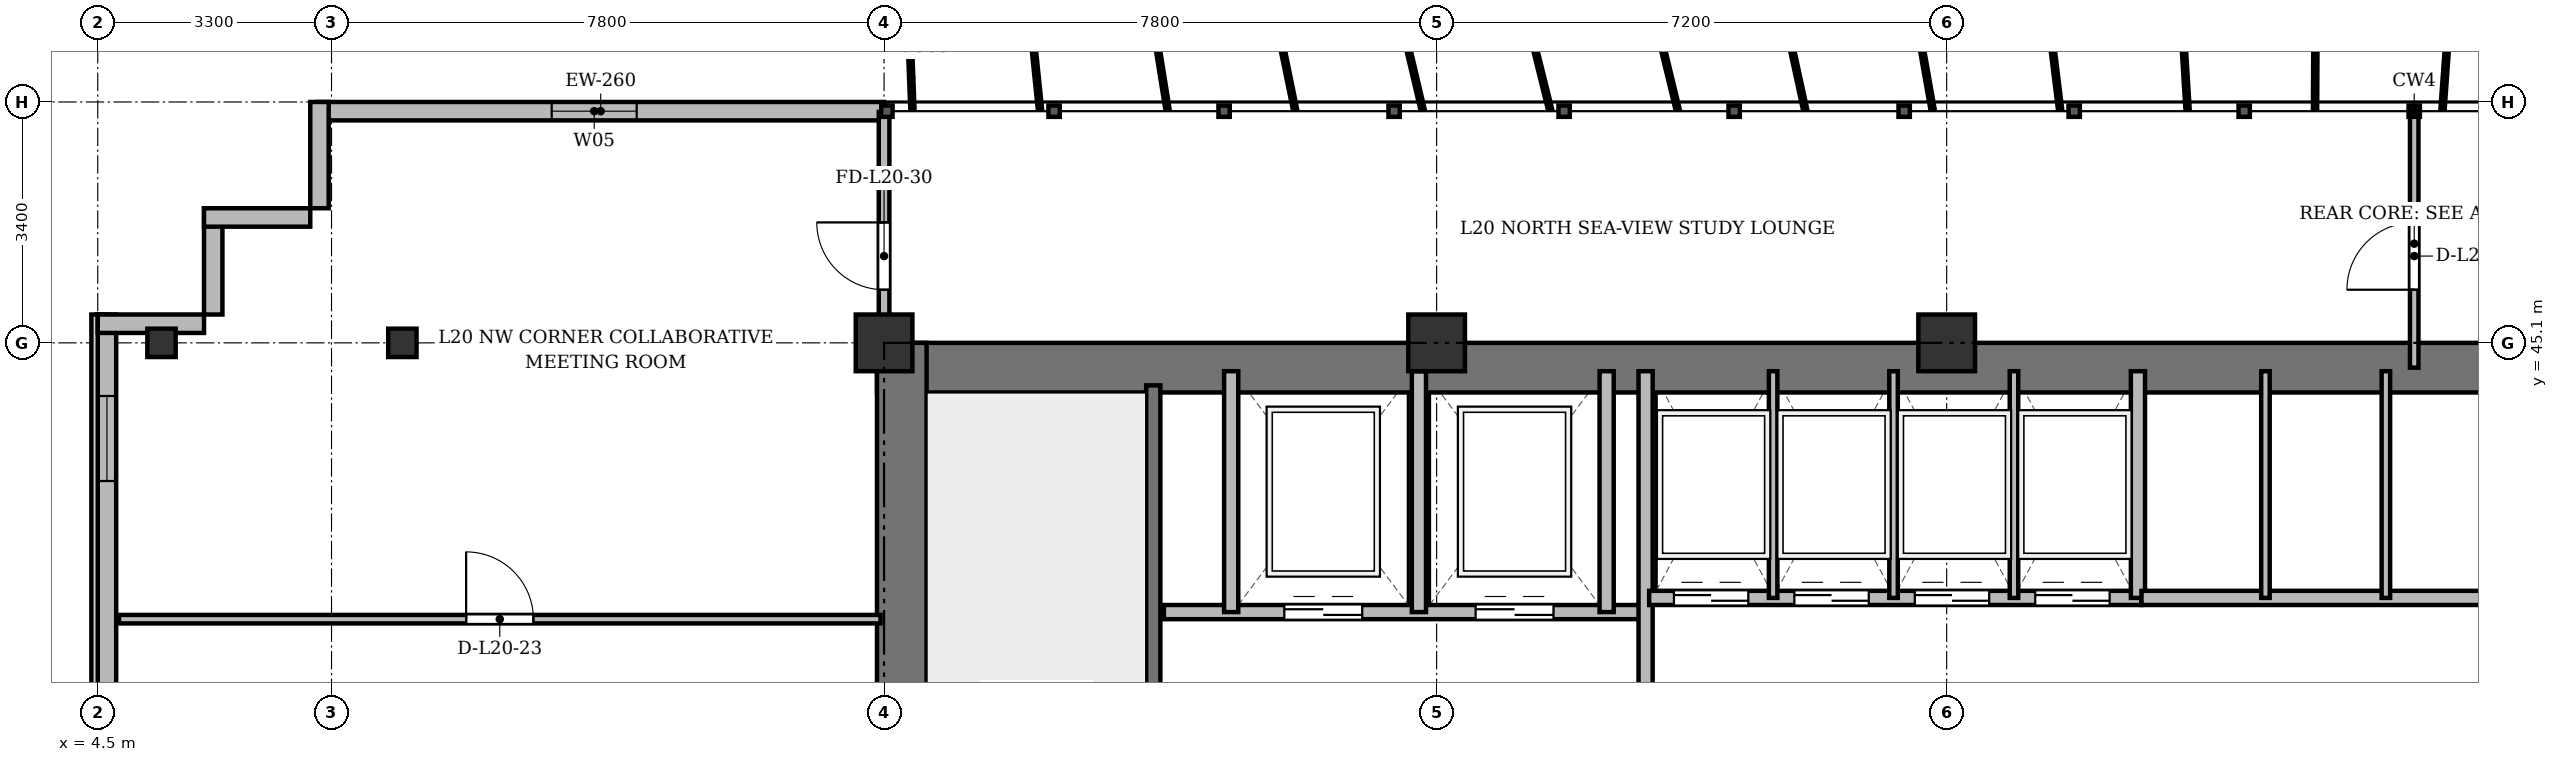
"""IFC4 building model, lengths in metres.
Left out: names, types, materials, properties, quantities, classifications, styles, units other than length and angle.
Written with IfcOpenShell. Run it as: python <this file> out.ifc"""

import sys

from ifc_helpers import new_model, si_unit, direction, frame, frame_2d, origin, origin_2d, place, context, subcontext, project, spatial, rectangle, i_section, extrude, source, transform, mapped, element, fill, save


model = new_model("IFC4")
c1 = context("Model", 3, precision=1e-05, world=origin(), true_north=direction((0.0, 1.0)))
c2 = subcontext(c1, "Body", "Model", "MODEL_VIEW")
j1 = project(units=[si_unit("LENGTHUNIT", "METRE"), si_unit("PLANEANGLEUNIT", "RADIAN")], contexts=[c1])
p1 = place(None, origin())
s1 = spatial("IfcSite", under=j1, at=p1, CompositionType="ELEMENT")
p2 = place(p1, origin())
s2 = spatial("IfcBuilding", under=s1, at=p2, CompositionType="ELEMENT")
p3 = place(p2, frame((0.0, 0.0, 81.7)))
s3 = spatial("IfcBuildingStorey", under=s2, at=p3, CompositionType="ELEMENT", Elevation=81.7)
m1 = source(origin(), c2, "Body", "SweptSolid", [
    extrude(i_section(OverallWidth=0.4, OverallDepth=0.4, WebThickness=0.022, FlangeThickness=0.035, at=origin_2d()), origin(), (0.0, 0.0, 1.0), 3.6),
])
for number, where, z_axis, x_axis in (
    (1, (5.4, 45.1, 0.0), (0.0, 0.0, 1.0), (1.0, 0.0, 0.0)),
    (2, (8.8, 45.1, 0.0), (0.0, 0.0, 1.0), (1.0, 0.0, 0.0)),
):
    element("IfcColumn", number, at=place(p3, frame(where, z_axis=z_axis, x_axis=x_axis)), inside=s3, PredefinedType="COLUMN", context=c2, shape_type="MappedRepresentation", body=[
        mapped(m1, transform((0.0, 0.0, 0.0), x_axis=(1.0, 0.0, 0.0), y_axis=(0.0, 1.0, 0.0), z_axis=(0.0, 0.0, 1.0), scale=1.0)),
    ])
m2 = source(origin(), c2, "Body", "SweptSolid", [
    extrude(rectangle(XDim=0.8, YDim=0.8, at=origin_2d()), origin(), (0.0, 0.0, 1.0), 3.6),
])
for number, where, z_axis, x_axis in (
    (3, (15.6, 45.1, 0.0), (0.0, 0.0, 1.0), (1.0, 0.0, 0.0)),
    (4, (23.4, 45.1, 0.0), (0.0, 0.0, 1.0), (1.0, 0.0, 0.0)),
    (5, (30.6, 45.1, 0.0), (0.0, 0.0, 1.0), (1.0, 0.0, 0.0)),
):
    element("IfcColumn", number, at=place(p3, frame(where, z_axis=z_axis, x_axis=x_axis)), inside=s3, PredefinedType="COLUMN", context=c2, shape_type="MappedRepresentation", body=[
        mapped(m2, transform((0.0, 0.0, 0.0), x_axis=(1.0, 0.0, 0.0), y_axis=(0.0, 1.0, 0.0), z_axis=(0.0, 0.0, 1.0), scale=1.0)),
    ])
p4 = place(p3, frame((7.6, 48.37, 0.0), z_axis=(0.0, 0.0, 1.0), x_axis=(1.0, 0.0, 0.0)))
e6 = element("IfcWall", 6, at=p4, inside=s3, PredefinedType="SOLIDWALL", context=c2, shape_type="SweptSolid", body=[
    extrude(rectangle(XDim=8.0, YDim=0.26, at=frame_2d((4.0, 0.0))), origin(), (0.0, 0.0, 1.0), 3.34),
])
p5 = place(p4, frame((3.308, 0.0, 0.9)))
e7 = element("IfcOpeningElement", 7, at=p5, cuts=e6, PredefinedType="OPENING", context=c2, shape_type="SweptSolid", body=[
    extrude(rectangle(XDim=1.2, YDim=1.65, at=frame_2d((0.6, 0.825))), frame((0.0, 0.14, 0.0), z_axis=(0.0, -1.0, 0.0), x_axis=(1.0, 0.0, 0.0)), (0.0, 0.0, 1.0), 0.28),
])
p6 = place(p3, frame((4.63, 5.9, 0.0), z_axis=(0.0, 0.0, 1.0), x_axis=(0.0, 1.0, 0.0)))
e8 = element("IfcWall", 8, at=p6, inside=s3, PredefinedType="SOLIDWALL", context=c2, shape_type="SweptSolid", body=[
    extrude(rectangle(XDim=39.6, YDim=0.26, at=frame_2d((19.8, 0.0))), origin(), (0.0, 0.0, 1.0), 3.34),
])
p7 = place(p6, frame((1.45, 0.0, 0.92)))
e9 = element("IfcOpeningElement", 9, at=p7, cuts=e8, PredefinedType="OPENING", context=c2, shape_type="SweptSolid", body=[
    extrude(rectangle(XDim=1.2, YDim=1.65, at=frame_2d((0.6, 0.825))), frame((0.0, 0.14, 0.0), z_axis=(0.0, -1.0, 0.0), x_axis=(1.0, 0.0, 0.0)), (0.0, 0.0, 1.0), 0.28),
])
p8 = place(p6, frame((4.2, 0.0, 0.92)))
e10 = element("IfcOpeningElement", 10, at=p8, cuts=e8, PredefinedType="OPENING", context=c2, shape_type="SweptSolid", body=[
    extrude(rectangle(XDim=2.6, YDim=1.9, at=frame_2d((1.3, 0.95))), frame((0.0, 0.14, 0.0), z_axis=(0.0, -1.0, 0.0), x_axis=(1.0, 0.0, 0.0)), (0.0, 0.0, 1.0), 0.28),
])
p9 = place(p6, frame((8.4, 0.0, 0.92)))
e11 = element("IfcOpeningElement", 11, at=p9, cuts=e8, PredefinedType="OPENING", context=c2, shape_type="SweptSolid", body=[
    extrude(rectangle(XDim=2.6, YDim=1.9, at=frame_2d((1.3, 0.95))), frame((0.0, 0.14, 0.0), z_axis=(0.0, -1.0, 0.0), x_axis=(1.0, 0.0, 0.0)), (0.0, 0.0, 1.0), 0.28),
])
p10 = place(p6, frame((15.6, 0.0, 0.92)))
e12 = element("IfcOpeningElement", 12, at=p10, cuts=e8, PredefinedType="OPENING", context=c2, shape_type="SweptSolid", body=[
    extrude(rectangle(XDim=2.6, YDim=1.9, at=frame_2d((1.3, 0.95))), frame((0.0, 0.14, 0.0), z_axis=(0.0, -1.0, 0.0), x_axis=(1.0, 0.0, 0.0)), (0.0, 0.0, 1.0), 0.28),
])
p11 = place(p6, frame((29.6, 0.0, 0.92)))
e13 = element("IfcOpeningElement", 13, at=p11, cuts=e8, PredefinedType="OPENING", context=c2, shape_type="SweptSolid", body=[
    extrude(rectangle(XDim=2.6, YDim=1.9, at=frame_2d((1.3, 0.95))), frame((0.0, 0.14, 0.0), z_axis=(0.0, -1.0, 0.0), x_axis=(1.0, 0.0, 0.0)), (0.0, 0.0, 1.0), 0.28),
])
p12 = place(p6, frame((37.25, 0.0, 0.92)))
e14 = element("IfcOpeningElement", 14, at=p12, cuts=e8, PredefinedType="OPENING", context=c2, shape_type="SweptSolid", body=[
    extrude(rectangle(XDim=1.2, YDim=1.65, at=frame_2d((0.6, 0.825))), frame((0.0, 0.14, 0.0), z_axis=(0.0, -1.0, 0.0), x_axis=(1.0, 0.0, 0.0)), (0.0, 0.0, 1.0), 0.28),
])
p13 = place(p3, frame((4.5, 45.37, 0.0), z_axis=(0.0, 0.0, 1.0), x_axis=(1.0, 0.0, 0.0)))
e15 = element("IfcWall", 15, at=p13, inside=s3, PredefinedType="SOLIDWALL", context=c2, shape_type="SweptSolid", body=[
    extrude(rectangle(XDim=1.5, YDim=0.26, at=frame_2d((0.75, 0.0))), origin(), (0.0, 0.0, 1.0), 2.752),
])
for number, where, z_axis, x_axis in (
    (16, (6.13, 45.5, 0.0), (0.0, 0.0, 1.0), (0.0, 1.0, 0.0)),
    (17, (6.0, 46.87, 0.0), (0.0, 0.0, 1.0), (1.0, 0.0, 0.0)),
    (18, (7.63, 47.0, 0.0), (0.0, 0.0, 1.0), (0.0, 1.0, 0.0)),
):
    element("IfcWall", number, at=place(p3, frame(where, z_axis=z_axis, x_axis=x_axis)), inside=s3, PredefinedType="SOLIDWALL", context=c2, shape_type="SweptSolid", body=[
        extrude(rectangle(XDim=1.5, YDim=0.26, at=frame_2d((0.75, 0.0))), origin(), (0.0, 0.0, 1.0), 3.34),
    ])
p14 = place(p3, frame((15.5, 44.75, 0.0), z_axis=(0.0, 0.0, 1.0), x_axis=(1.0, 0.0, 0.0)))
e19 = element("IfcWall", 19, at=p14, inside=s3, PredefinedType="SHEAR", context=c2, shape_type="SweptSolid", body=[
    extrude(rectangle(XDim=43.4, YDim=0.7, at=frame_2d((21.7, 0.0))), origin(), (0.0, 0.0, 1.0), 3.34),
])
p15 = place(p3, frame((15.85, 33.4, 0.0), z_axis=(0.0, 0.0, 1.0), x_axis=(0.0, 1.0, 0.0)))
e20 = element("IfcWall", 20, at=p15, inside=s3, PredefinedType="SHEAR", context=c2, shape_type="SweptSolid", body=[
    extrude(rectangle(XDim=11.7, YDim=0.7, at=frame_2d((5.85, 0.0))), origin(), (0.0, 0.0, 1.0), 3.34),
])
p16 = place(p3, frame((19.4, 33.4, 0.0), z_axis=(0.0, 0.0, 1.0), x_axis=(0.0, 1.0, 0.0)))
e21 = element("IfcWall", 21, at=p16, inside=s3, PredefinedType="SHEAR", context=c2, shape_type="SweptSolid", body=[
    extrude(rectangle(XDim=11.1, YDim=0.2, at=frame_2d((5.55, 0.0))), origin(), (0.0, 0.0, 1.0), 3.34),
])
p17 = place(p16, frame((0.85, 0.0, 0.0)))
e22 = element("IfcOpeningElement", 22, at=p17, cuts=e21, PredefinedType="OPENING", context=c2, shape_type="SweptSolid", body=[
    extrude(rectangle(XDim=1.1, YDim=2.15, at=frame_2d((0.55, 1.075))), frame((0.0, 0.11, 0.0), z_axis=(0.0, -1.0, 0.0), x_axis=(1.0, 0.0, 0.0)), (0.0, 0.0, 1.0), 0.22),
])
p18 = place(p3, frame((19.55, 41.3, 0.0), z_axis=(0.0, 0.0, 1.0), x_axis=(1.0, 0.0, 0.0)))
e23 = element("IfcWall", 23, at=p18, inside=s3, PredefinedType="SOLIDWALL", context=c2, shape_type="SweptSolid", body=[
    extrude(rectangle(XDim=6.75, YDim=0.2, at=frame_2d((3.375, 0.0))), origin(), (0.0, 0.0, 1.0), 3.34),
])
p19 = place(p18, frame((1.7, 0.0, 0.0)))
e24 = element("IfcOpeningElement", 24, at=p19, cuts=e23, PredefinedType="OPENING", context=c2, shape_type="SweptSolid", body=[
    extrude(rectangle(XDim=1.1, YDim=2.15, at=frame_2d((0.55, 1.075))), frame((0.0, 0.11, 0.0), z_axis=(0.0, -1.0, 0.0), x_axis=(1.0, 0.0, 0.0)), (0.0, 0.0, 1.0), 0.22),
])
p20 = place(p18, frame((4.4, 0.0, 0.0)))
e25 = element("IfcOpeningElement", 25, at=p20, cuts=e23, PredefinedType="OPENING", context=c2, shape_type="SweptSolid", body=[
    extrude(rectangle(XDim=1.1, YDim=2.15, at=frame_2d((0.55, 1.075))), frame((0.0, 0.11, 0.0), z_axis=(0.0, -1.0, 0.0), x_axis=(1.0, 0.0, 0.0)), (0.0, 0.0, 1.0), 0.22),
])
for number, where, z_axis, x_axis in (
    (26, (20.5, 41.3, 0.0), (0.0, 0.0, 1.0), (0.0, 1.0, 0.0)),
    (27, (23.15, 41.3, 0.0), (0.0, 0.0, 1.0), (0.0, 1.0, 0.0)),
    (28, (25.8, 41.3, 0.0), (0.0, 0.0, 1.0), (0.0, 1.0, 0.0)),
):
    element("IfcWall", number, at=place(p3, frame(where, z_axis=z_axis, x_axis=x_axis)), inside=s3, PredefinedType="SOLIDWALL", context=c2, shape_type="SweptSolid", body=[
        extrude(rectangle(XDim=3.4, YDim=0.2, at=frame_2d((1.7, 0.0))), origin(), (0.0, 0.0, 1.0), 3.34),
    ])
p21 = place(p3, frame((26.35, 33.4, 0.0), z_axis=(0.0, 0.0, 1.0), x_axis=(0.0, 1.0, 0.0)))
e29 = element("IfcWall", 29, at=p21, inside=s3, PredefinedType="SOLIDWALL", context=c2, shape_type="SweptSolid", body=[
    extrude(rectangle(XDim=11.3, YDim=0.2, at=frame_2d((5.65, 0.0))), origin(), (0.0, 0.0, 1.0), 2.752),
])
p22 = place(p3, frame((26.4, 41.5, 0.0), z_axis=(0.0, 0.0, 1.0), x_axis=(1.0, 0.0, 0.0)))
e30 = element("IfcWall", 30, at=p22, inside=s3, PredefinedType="SOLIDWALL", context=c2, shape_type="SweptSolid", body=[
    extrude(rectangle(XDim=6.95, YDim=0.2, at=frame_2d((3.475, 0.0))), origin(), (0.0, 0.0, 1.0), 3.34),
])
p23 = place(p22, frame((0.35, 0.0, 0.0)))
e31 = element("IfcOpeningElement", 31, at=p23, cuts=e30, PredefinedType="OPENING", context=c2, shape_type="SweptSolid", body=[
    extrude(rectangle(XDim=1.05, YDim=2.15, at=frame_2d((0.525, 1.075))), frame((0.0, 0.11, 0.0), z_axis=(0.0, -1.0, 0.0), x_axis=(1.0, 0.0, 0.0)), (0.0, 0.0, 1.0), 0.22),
])
p24 = place(p22, frame((2.05, 0.0, 0.0)))
e32 = element("IfcOpeningElement", 32, at=p24, cuts=e30, PredefinedType="OPENING", context=c2, shape_type="SweptSolid", body=[
    extrude(rectangle(XDim=1.05, YDim=2.15, at=frame_2d((0.525, 1.075))), frame((0.0, 0.11, 0.0), z_axis=(0.0, -1.0, 0.0), x_axis=(1.0, 0.0, 0.0)), (0.0, 0.0, 1.0), 0.22),
])
p25 = place(p22, frame((3.75, 0.0, 0.0)))
e33 = element("IfcOpeningElement", 33, at=p25, cuts=e30, PredefinedType="OPENING", context=c2, shape_type="SweptSolid", body=[
    extrude(rectangle(XDim=1.05, YDim=2.15, at=frame_2d((0.525, 1.075))), frame((0.0, 0.11, 0.0), z_axis=(0.0, -1.0, 0.0), x_axis=(1.0, 0.0, 0.0)), (0.0, 0.0, 1.0), 0.22),
])
p26 = place(p22, frame((5.45, 0.0, 0.0)))
e34 = element("IfcOpeningElement", 34, at=p26, cuts=e30, PredefinedType="OPENING", context=c2, shape_type="SweptSolid", body=[
    extrude(rectangle(XDim=1.05, YDim=2.15, at=frame_2d((0.525, 1.075))), frame((0.0, 0.11, 0.0), z_axis=(0.0, -1.0, 0.0), x_axis=(1.0, 0.0, 0.0)), (0.0, 0.0, 1.0), 0.22),
])
p27 = place(p3, frame((33.3, 41.5, 0.0), z_axis=(0.0, 0.0, 1.0), x_axis=(0.0, 1.0, 0.0)))
e35 = element("IfcWall", 35, at=p27, inside=s3, PredefinedType="SOLIDWALL", context=c2, shape_type="SweptSolid", body=[
    extrude(rectangle(XDim=3.2, YDim=0.2, at=frame_2d((1.6, 0.0))), origin(), (0.0, 0.0, 1.0), 3.34),
])
for number, where, z_axis, x_axis in (
    (36, (28.15, 41.5, 0.0), (0.0, 0.0, 1.0), (0.0, 1.0, 0.0)),
    (37, (29.85, 41.5, 0.0), (0.0, 0.0, 1.0), (0.0, 1.0, 0.0)),
    (38, (31.55, 41.5, 0.0), (0.0, 0.0, 1.0), (0.0, 1.0, 0.0)),
):
    element("IfcWall", number, at=place(p3, frame(where, z_axis=z_axis, x_axis=x_axis)), inside=s3, PredefinedType="PARTITIONING", context=c2, shape_type="SweptSolid", body=[
        extrude(rectangle(XDim=3.2, YDim=0.12, at=frame_2d((1.6, 0.0))), origin(), (0.0, 0.0, 1.0), 3.34),
    ])
p28 = place(p3, frame((33.35, 41.5, 0.0), z_axis=(0.0, 0.0, 1.0), x_axis=(1.0, 0.0, 0.0)))
e39 = element("IfcWall", 39, at=p28, inside=s3, PredefinedType="SOLIDWALL", context=c2, shape_type="SweptSolid", body=[
    extrude(rectangle(XDim=6.9, YDim=0.2, at=frame_2d((3.45, 0.0))), origin(), (0.0, 0.0, 1.0), 3.34),
])
for number, where, z_axis, x_axis in (
    (40, (35.1, 41.5, 0.0), (0.0, 0.0, 1.0), (0.0, 1.0, 0.0)),
    (41, (36.8, 41.5, 0.0), (0.0, 0.0, 1.0), (0.0, 1.0, 0.0)),
):
    element("IfcWall", number, at=place(p3, frame(where, z_axis=z_axis, x_axis=x_axis)), inside=s3, PredefinedType="PARTITIONING", context=c2, shape_type="SweptSolid", body=[
        extrude(rectangle(XDim=3.2, YDim=0.12, at=frame_2d((1.6, 0.0))), origin(), (0.0, 0.0, 1.0), 3.34),
    ])
p29 = place(p3, frame((4.8, 41.2, 0.0), z_axis=(0.0, 0.0, 1.0), x_axis=(1.0, 0.0, 0.0)))
e42 = element("IfcWall", 42, at=p29, inside=s3, PredefinedType="PARTITIONING", context=c2, shape_type="SweptSolid", body=[
    extrude(rectangle(XDim=10.75, YDim=0.12, at=frame_2d((5.375, 0.0))), origin(), (0.0, 0.0, 1.0), 2.84),
])
p30 = place(p29, frame((4.9, 0.0, 0.0)))
e43 = element("IfcOpeningElement", 43, at=p30, cuts=e42, PredefinedType="OPENING", context=c2, shape_type="SweptSolid", body=[
    extrude(rectangle(XDim=0.95, YDim=2.15, at=frame_2d((0.475, 1.075))), frame((0.0, 0.07, 0.0), z_axis=(0.0, -1.0, 0.0), x_axis=(1.0, 0.0, 0.0)), (0.0, 0.0, 1.0), 0.14),
])
p31 = place(p3, frame((37.2, 44.75, 0.0), z_axis=(0.0, 0.0, 1.0), x_axis=(0.0, 1.0, 0.0)))
e44 = element("IfcWall", 44, at=p31, inside=s3, PredefinedType="PARTITIONING", context=c2, shape_type="SweptSolid", body=[
    extrude(rectangle(XDim=3.61, YDim=0.12, at=frame_2d((1.805, 0.0))), origin(), (0.0, 0.0, 1.0), 2.752),
])
p32 = place(p31, frame((1.1, 0.0, 0.0)))
e45 = element("IfcOpeningElement", 45, at=p32, cuts=e44, PredefinedType="OPENING", context=c2, shape_type="SweptSolid", body=[
    extrude(rectangle(XDim=0.95, YDim=2.15, at=frame_2d((0.475, 1.075))), frame((0.0, 0.07, 0.0), z_axis=(0.0, -1.0, 0.0), x_axis=(1.0, 0.0, 0.0)), (0.0, 0.0, 1.0), 0.14),
])
p33 = place(p3, frame((15.6, 44.75, 0.0), z_axis=(0.0, 0.0, 1.0), x_axis=(0.0, 1.0, 0.0)))
e46 = element("IfcWall", 46, at=p33, inside=s3, PredefinedType="PARTITIONING", context=c2, shape_type="SweptSolid", body=[
    extrude(rectangle(XDim=3.61, YDim=0.15, at=frame_2d((1.805, 0.0))), origin(), (0.0, 0.0, 1.0), 2.84),
])
p34 = place(p33, frame((1.1, 0.0, 0.0)))
e47 = element("IfcOpeningElement", 47, at=p34, cuts=e46, PredefinedType="OPENING", context=c2, shape_type="SweptSolid", body=[
    extrude(rectangle(XDim=0.95, YDim=2.15, at=frame_2d((0.475, 1.075))), frame((0.0, 0.085, 0.0), z_axis=(0.0, -1.0, 0.0), x_axis=(1.0, 0.0, 0.0)), (0.0, 0.0, 1.0), 0.17),
])
m3 = source(origin(), c2, "Body", "SweptSolid", [
    extrude(rectangle(XDim=1.2, YDim=1.65, at=frame_2d((0.6, 0.825))), frame((0.0, 0.03, 0.0), z_axis=(0.0, -1.0, 0.0), x_axis=(1.0, 0.0, 0.0)), (0.0, 0.0, 1.0), 0.06),
])
p35 = place(p5, origin())
e48 = element("IfcWindow", 48, at=p35, inside=s3, PartitioningType="SINGLE_PANEL", PredefinedType="WINDOW", context=c2, shape_type="MappedRepresentation", body=[
    mapped(m3, transform((0.0, 0.0, 0.0), x_axis=(1.0, 0.0, 0.0), y_axis=(0.0, 1.0, 0.0), z_axis=(0.0, 0.0, 1.0), scale=1.0)),
])
fill(e7, e48)
p36 = place(p12, origin())
e49 = element("IfcWindow", 49, at=p36, inside=s3, PartitioningType="SINGLE_PANEL", PredefinedType="WINDOW", context=c2, shape_type="MappedRepresentation", body=[
    mapped(m3, transform((0.0, 0.0, 0.0), x_axis=(1.0, 0.0, 0.0), y_axis=(0.0, 1.0, 0.0), z_axis=(0.0, 0.0, 1.0), scale=1.0)),
])
fill(e14, e49)
m4 = source(origin(), c2, "Body", "SweptSolid", [
    extrude(rectangle(XDim=1.1, YDim=2.15, at=frame_2d((0.55, 1.075))), frame((0.0, 0.025, 0.0), z_axis=(0.0, -1.0, 0.0), x_axis=(1.0, 0.0, 0.0)), (0.0, 0.0, 1.0), 0.05),
])
p37 = place(p19, origin())
e50 = element("IfcDoor", 50, at=p37, inside=s3, OperationType="DOUBLE_DOOR_SLIDING", PredefinedType="DOOR", context=c2, shape_type="MappedRepresentation", body=[
    mapped(m4, transform((0.0, 0.0, 0.0), x_axis=(1.0, 0.0, 0.0), y_axis=(0.0, 1.0, 0.0), z_axis=(0.0, 0.0, 1.0), scale=1.0)),
])
fill(e24, e50)
p38 = place(p20, origin())
e51 = element("IfcDoor", 51, at=p38, inside=s3, OperationType="DOUBLE_DOOR_SLIDING", PredefinedType="DOOR", context=c2, shape_type="MappedRepresentation", body=[
    mapped(m4, transform((0.0, 0.0, 0.0), x_axis=(1.0, 0.0, 0.0), y_axis=(0.0, 1.0, 0.0), z_axis=(0.0, 0.0, 1.0), scale=1.0)),
])
fill(e25, e51)
m5 = source(origin(), c2, "Body", "SweptSolid", [
    extrude(rectangle(XDim=1.05, YDim=2.15, at=frame_2d((0.525, 1.075))), frame((0.0, 0.025, 0.0), z_axis=(0.0, -1.0, 0.0), x_axis=(1.0, 0.0, 0.0)), (0.0, 0.0, 1.0), 0.05),
])
p39 = place(p23, origin())
e52 = element("IfcDoor", 52, at=p39, inside=s3, OperationType="DOUBLE_DOOR_SLIDING", PredefinedType="DOOR", context=c2, shape_type="MappedRepresentation", body=[
    mapped(m5, transform((0.0, 0.0, 0.0), x_axis=(1.0, 0.0, 0.0), y_axis=(0.0, 1.0, 0.0), z_axis=(0.0, 0.0, 1.0), scale=1.0)),
])
fill(e31, e52)
p40 = place(p24, origin())
e53 = element("IfcDoor", 53, at=p40, inside=s3, OperationType="DOUBLE_DOOR_SLIDING", PredefinedType="DOOR", context=c2, shape_type="MappedRepresentation", body=[
    mapped(m5, transform((0.0, 0.0, 0.0), x_axis=(1.0, 0.0, 0.0), y_axis=(0.0, 1.0, 0.0), z_axis=(0.0, 0.0, 1.0), scale=1.0)),
])
fill(e32, e53)
p41 = place(p25, origin())
e54 = element("IfcDoor", 54, at=p41, inside=s3, OperationType="DOUBLE_DOOR_SLIDING", PredefinedType="DOOR", context=c2, shape_type="MappedRepresentation", body=[
    mapped(m5, transform((0.0, 0.0, 0.0), x_axis=(1.0, 0.0, 0.0), y_axis=(0.0, 1.0, 0.0), z_axis=(0.0, 0.0, 1.0), scale=1.0)),
])
fill(e33, e54)
p42 = place(p26, origin())
e55 = element("IfcDoor", 55, at=p42, inside=s3, OperationType="DOUBLE_DOOR_SLIDING", PredefinedType="DOOR", context=c2, shape_type="MappedRepresentation", body=[
    mapped(m5, transform((0.0, 0.0, 0.0), x_axis=(1.0, 0.0, 0.0), y_axis=(0.0, 1.0, 0.0), z_axis=(0.0, 0.0, 1.0), scale=1.0)),
])
fill(e34, e55)
m6 = source(origin(), c2, "Body", "SweptSolid", [
    extrude(rectangle(XDim=0.95, YDim=2.15, at=frame_2d((0.475, 1.075))), frame((0.0, 0.025, 0.0), z_axis=(0.0, -1.0, 0.0), x_axis=(1.0, 0.0, 0.0)), (0.0, 0.0, 1.0), 0.05),
])
p43 = place(p30, origin())
e56 = element("IfcDoor", 56, at=p43, inside=s3, OperationType="SINGLE_SWING_LEFT", PredefinedType="DOOR", context=c2, shape_type="MappedRepresentation", body=[
    mapped(m6, transform((0.0, 0.0, 0.0), x_axis=(1.0, 0.0, 0.0), y_axis=(0.0, 1.0, 0.0), z_axis=(0.0, 0.0, 1.0), scale=1.0)),
])
fill(e43, e56)
p44 = place(p32, origin())
e57 = element("IfcDoor", 57, at=p44, inside=s3, OperationType="SINGLE_SWING_LEFT", PredefinedType="DOOR", context=c2, shape_type="MappedRepresentation", body=[
    mapped(m6, transform((0.0, 0.0, 0.0), x_axis=(1.0, 0.0, 0.0), y_axis=(0.0, 1.0, 0.0), z_axis=(0.0, 0.0, 1.0), scale=1.0)),
])
fill(e45, e57)
p45 = place(p34, origin())
e58 = element("IfcDoor", 58, at=p45, inside=s3, OperationType="SINGLE_SWING_RIGHT", PredefinedType="DOOR", context=c2, shape_type="MappedRepresentation", body=[
    mapped(m6, transform((0.0, 0.0, 0.0), x_axis=(1.0, 0.0, 0.0), y_axis=(0.0, 1.0, 0.0), z_axis=(0.0, 0.0, 1.0), scale=1.0)),
])
fill(e47, e58)
save(model, sys.argv[1])
